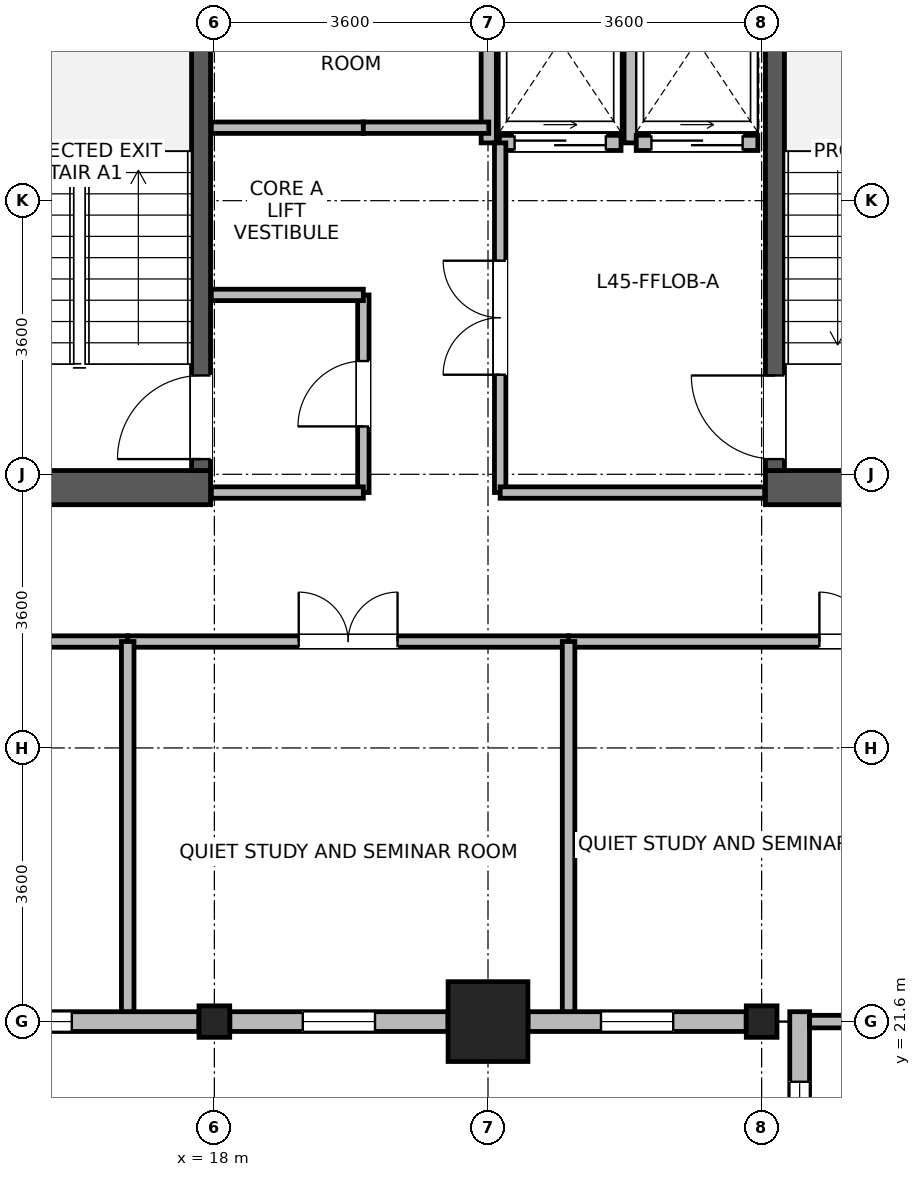
"""IFC4 building model, lengths in metres.
Left out: names, types, materials, properties, quantities, classifications, styles, units other than length and angle.
Written with IfcOpenShell. Run it as: python <this file> out.ifc"""

import sys

from ifc_helpers import new_model, si_unit, direction, frame, frame_2d, origin, origin_2d, place, context, subcontext, project, spatial, rectangle, i_section, extrude, source, transform, mapped, element, fill, save


model = new_model("IFC4")
c1 = context("Model", 3, precision=1e-05, world=origin(), true_north=direction((0.0, 1.0)))
c2 = subcontext(c1, "Body", "Model", "MODEL_VIEW")
j1 = project(units=[si_unit("LENGTHUNIT", "METRE"), si_unit("PLANEANGLEUNIT", "RADIAN")], contexts=[c1])
p1 = place(None, origin())
s1 = spatial("IfcSite", under=j1, at=p1, CompositionType="ELEMENT")
p2 = place(p1, origin())
s2 = spatial("IfcBuilding", under=s1, at=p2, CompositionType="ELEMENT")
p3 = place(p2, frame((0.0, 0.0, 177.2)))
s3 = spatial("IfcBuildingStorey", under=s2, at=p3, CompositionType="ELEMENT", Elevation=177.2)
for number, where, z_axis, x_axis in (
    (1, (14.75, 28.625, 0.0), (0.0, 0.0, 1.0), (1.0, 0.0, 0.0)),
    (2, (25.25, 28.625, 0.0), (0.0, 0.0, 1.0), (1.0, 0.0, 0.0)),
):
    element("IfcWall", number, at=place(p3, frame(where, z_axis=z_axis, x_axis=x_axis)), inside=s3, PredefinedType="SHEAR", context=c2, shape_type="SweptSolid", body=[
        extrude(rectangle(XDim=3.2, YDim=0.45, at=frame_2d((1.6, 0.0))), origin(), (0.0, 0.0, 1.0), 3.46),
    ])
p4 = place(p3, frame((17.825, 28.85, 0.0), z_axis=(0.0, 0.0, 1.0), x_axis=(0.0, 1.0, 0.0)))
e3 = element("IfcWall", 3, at=p4, inside=s3, PredefinedType="SHEAR", context=c2, shape_type="SweptSolid", body=[
    extrude(rectangle(XDim=7.0, YDim=0.25, at=frame_2d((3.5, 0.0))), origin(), (0.0, 0.0, 1.0), 3.46),
])
p5 = place(p4, frame((0.15, 0.0, 0.0)))
e4 = element("IfcOpeningElement", 4, at=p5, cuts=e3, PredefinedType="OPENING", context=c2, shape_type="SweptSolid", body=[
    extrude(rectangle(XDim=1.1, YDim=2.08, at=frame_2d((0.55, 1.04))), frame((0.0, 0.135, 0.0), z_axis=(0.0, -1.0, 0.0), x_axis=(1.0, 0.0, 0.0)), (0.0, 0.0, 1.0), 0.27),
])
p6 = place(p3, frame((25.375, 28.85, 0.0), z_axis=(0.0, 0.0, 1.0), x_axis=(0.0, 1.0, 0.0)))
e5 = element("IfcWall", 5, at=p6, inside=s3, PredefinedType="SHEAR", context=c2, shape_type="SweptSolid", body=[
    extrude(rectangle(XDim=7.0, YDim=0.25, at=frame_2d((3.5, 0.0))), origin(), (0.0, 0.0, 1.0), 3.46),
])
p7 = place(p6, frame((0.15, 0.0, 0.0)))
e6 = element("IfcOpeningElement", 6, at=p7, cuts=e5, PredefinedType="OPENING", context=c2, shape_type="SweptSolid", body=[
    extrude(rectangle(XDim=1.1, YDim=2.08, at=frame_2d((0.55, 1.04))), frame((0.0, 0.135, 0.0), z_axis=(0.0, -1.0, 0.0), x_axis=(1.0, 0.0, 0.0)), (0.0, 0.0, 1.0), 0.27),
])
m1 = source(origin(), c2, "Body", "SweptSolid", [
    extrude(rectangle(XDim=1.05, YDim=1.05, at=origin_2d()), origin(), (0.0, 0.0, 1.0), 3.7),
])
p8 = place(p3, frame((21.6, 21.6, 0.0), z_axis=(0.0, 0.0, 1.0), x_axis=(1.0, 0.0, 0.0)))
e7 = element("IfcColumn", 7, at=p8, inside=s3, PredefinedType="COLUMN", context=c2, shape_type="MappedRepresentation", body=[
    mapped(m1, transform((0.0, 0.0, 0.0), x_axis=(1.0, 0.0, 0.0), y_axis=(0.0, 1.0, 0.0), z_axis=(0.0, 0.0, 1.0), scale=1.0)),
])
m2 = source(origin(), c2, "Body", "SweptSolid", [
    extrude(i_section(OverallWidth=0.404, OverallDepth=0.414, WebThickness=0.021, FlangeThickness=0.028, FilletRadius=0.015, at=origin_2d()), origin(), (0.0, 0.0, 1.0), 3.7),
])
for number, where, z_axis, x_axis in (
    (8, (18.0, 21.6, 0.0), (0.0, 0.0, 1.0), (1.0, 0.0, 0.0)),
    (9, (25.2, 21.6, 0.0), (0.0, 0.0, 1.0), (1.0, 0.0, 0.0)),
):
    element("IfcColumn", number, at=place(p3, frame(where, z_axis=z_axis, x_axis=x_axis)), inside=s3, PredefinedType="COLUMN", context=c2, shape_type="MappedRepresentation", body=[
        mapped(m2, transform((0.0, 0.0, 0.0), x_axis=(1.0, 0.0, 0.0), y_axis=(0.0, 1.0, 0.0), z_axis=(0.0, 0.0, 1.0), scale=1.0)),
    ])
p9 = place(p3, frame((17.797, 21.6, 0.0), z_axis=(0.0, 0.0, 1.0), x_axis=(-1.0, 0.0, 0.0)))
e10 = element("IfcWall", 10, at=p9, inside=s3, PredefinedType="STANDARD", context=c2, shape_type="SweptSolid", body=[
    extrude(rectangle(XDim=2.871, YDim=0.26, at=frame_2d((1.436, 0.0))), origin(), (0.0, 0.0, 1.0), 2.99),
])
p10 = place(p9, frame((1.673, 0.0, 0.85)))
e11 = element("IfcOpeningElement", 11, at=p10, cuts=e10, PredefinedType="OPENING", context=c2, shape_type="SweptSolid", body=[
    extrude(rectangle(XDim=0.95, YDim=1.75, at=frame_2d((0.475, 0.875))), frame((0.0, 0.14, 0.0), z_axis=(0.0, -1.0, 0.0), x_axis=(1.0, 0.0, 0.0)), (0.0, 0.0, 1.0), 0.28),
])
p11 = place(p3, frame((21.074, 21.6, 0.0), z_axis=(0.0, 0.0, 1.0), x_axis=(-1.0, 0.0, 0.0)))
e12 = element("IfcWall", 12, at=p11, inside=s3, PredefinedType="STANDARD", context=c2, shape_type="SweptSolid", body=[
    extrude(rectangle(XDim=2.871, YDim=0.26, at=frame_2d((1.436, 0.0))), origin(), (0.0, 0.0, 1.0), 2.99),
])
p12 = place(p11, frame((0.96, 0.0, 0.85)))
e13 = element("IfcOpeningElement", 13, at=p12, cuts=e12, PredefinedType="OPENING", context=c2, shape_type="SweptSolid", body=[
    extrude(rectangle(XDim=0.95, YDim=1.75, at=frame_2d((0.475, 0.875))), frame((0.0, 0.14, 0.0), z_axis=(0.0, -1.0, 0.0), x_axis=(1.0, 0.0, 0.0)), (0.0, 0.0, 1.0), 0.28),
])
p13 = place(p3, frame((24.997, 21.6, 0.0), z_axis=(0.0, 0.0, 1.0), x_axis=(-1.0, 0.0, 0.0)))
e14 = element("IfcWall", 14, at=p13, inside=s3, PredefinedType="STANDARD", context=c2, shape_type="SweptSolid", body=[
    extrude(rectangle(XDim=2.871, YDim=0.26, at=frame_2d((1.436, 0.0))), origin(), (0.0, 0.0, 1.0), 2.99),
])
p14 = place(p13, frame((0.96, 0.0, 0.85)))
e15 = element("IfcOpeningElement", 15, at=p14, cuts=e14, PredefinedType="OPENING", context=c2, shape_type="SweptSolid", body=[
    extrude(rectangle(XDim=0.95, YDim=1.75, at=frame_2d((0.475, 0.875))), frame((0.0, 0.14, 0.0), z_axis=(0.0, -1.0, 0.0), x_axis=(1.0, 0.0, 0.0)), (0.0, 0.0, 1.0), 0.28),
])
p15 = place(p3, frame((25.7, 1.67, 0.0), z_axis=(0.0, 0.0, 1.0), x_axis=(0.0, 1.0, 0.0)))
e16 = element("IfcWall", 16, at=p15, inside=s3, PredefinedType="STANDARD", context=c2, shape_type="SweptSolid", body=[
    extrude(rectangle(XDim=20.06, YDim=0.26, at=frame_2d((10.03, 0.0))), origin(), (0.0, 0.0, 1.0), 3.44),
])
p16 = place(p15, frame((0.922, 0.0, 0.85)))
e17 = element("IfcOpeningElement", 17, at=p16, cuts=e16, PredefinedType="OPENING", context=c2, shape_type="SweptSolid", body=[
    extrude(rectangle(XDim=1.5, YDim=1.85, at=frame_2d((0.75, 0.925))), frame((0.0, 0.14, 0.0), z_axis=(0.0, -1.0, 0.0), x_axis=(1.0, 0.0, 0.0)), (0.0, 0.0, 1.0), 0.28),
])
p17 = place(p15, frame((7.608, 0.0, 0.85)))
e18 = element("IfcOpeningElement", 18, at=p17, cuts=e16, PredefinedType="OPENING", context=c2, shape_type="SweptSolid", body=[
    extrude(rectangle(XDim=1.5, YDim=1.85, at=frame_2d((0.75, 0.925))), frame((0.0, 0.14, 0.0), z_axis=(0.0, -1.0, 0.0), x_axis=(1.0, 0.0, 0.0)), (0.0, 0.0, 1.0), 0.28),
])
p18 = place(p15, frame((10.952, 0.0, 0.85)))
e19 = element("IfcOpeningElement", 19, at=p18, cuts=e16, PredefinedType="OPENING", context=c2, shape_type="SweptSolid", body=[
    extrude(rectangle(XDim=1.5, YDim=1.85, at=frame_2d((0.75, 0.925))), frame((0.0, 0.14, 0.0), z_axis=(0.0, -1.0, 0.0), x_axis=(1.0, 0.0, 0.0)), (0.0, 0.0, 1.0), 0.28),
])
p19 = place(p15, frame((14.295, 0.0, 0.85)))
e20 = element("IfcOpeningElement", 20, at=p19, cuts=e16, PredefinedType="OPENING", context=c2, shape_type="SweptSolid", body=[
    extrude(rectangle(XDim=1.5, YDim=1.85, at=frame_2d((0.75, 0.925))), frame((0.0, 0.14, 0.0), z_axis=(0.0, -1.0, 0.0), x_axis=(1.0, 0.0, 0.0)), (0.0, 0.0, 1.0), 0.28),
])
p20 = place(p15, frame((17.638, 0.0, 0.85)))
e21 = element("IfcOpeningElement", 21, at=p20, cuts=e16, PredefinedType="OPENING", context=c2, shape_type="SweptSolid", body=[
    extrude(rectangle(XDim=1.5, YDim=1.85, at=frame_2d((0.75, 0.925))), frame((0.0, 0.14, 0.0), z_axis=(0.0, -1.0, 0.0), x_axis=(1.0, 0.0, 0.0)), (0.0, 0.0, 1.0), 0.28),
])
p21 = place(p3, frame((21.75, 33.16, 0.0), z_axis=(0.0, 0.0, 1.0), x_axis=(1.0, 0.0, 0.0)))
e22 = element("IfcWall", 22, at=p21, inside=s3, PredefinedType="PARTITIONING", context=c2, shape_type="SweptSolid", body=[
    extrude(rectangle(XDim=1.6, YDim=0.2, at=frame_2d((0.8, 0.0))), origin(), (0.0, 0.0, 1.0), 3.44),
])
p22 = place(p21, frame((0.2, 0.0, 0.0)))
e23 = element("IfcOpeningElement", 23, at=p22, cuts=e22, PredefinedType="OPENING", context=c2, shape_type="SweptSolid", body=[
    extrude(rectangle(XDim=1.2, YDim=2.12, at=frame_2d((0.6, 1.06))), frame((0.0, 0.11, 0.0), z_axis=(0.0, -1.0, 0.0), x_axis=(1.0, 0.0, 0.0)), (0.0, 0.0, 1.0), 0.22),
])
for number, where, z_axis, x_axis in (
    (24, (21.61, 33.16, 0.0), (0.0, 0.0, 1.0), (0.0, 1.0, 0.0)),
    (25, (23.49, 33.16, 0.0), (0.0, 0.0, 1.0), (0.0, 1.0, 0.0)),
):
    element("IfcWall", number, at=place(p3, frame(where, z_axis=z_axis, x_axis=x_axis)), inside=s3, PredefinedType="PARTITIONING", context=c2, shape_type="SweptSolid", body=[
        extrude(rectangle(XDim=2.68, YDim=0.2, at=frame_2d((1.34, 0.0))), origin(), (0.0, 0.0, 1.0), 3.44),
    ])
p23 = place(p3, frame((23.55, 33.16, 0.0), z_axis=(0.0, 0.0, 1.0), x_axis=(1.0, 0.0, 0.0)))
e26 = element("IfcWall", 26, at=p23, inside=s3, PredefinedType="PARTITIONING", context=c2, shape_type="SweptSolid", body=[
    extrude(rectangle(XDim=1.6, YDim=0.2, at=frame_2d((0.8, 0.0))), origin(), (0.0, 0.0, 1.0), 3.44),
])
p24 = place(p23, frame((0.2, 0.0, 0.0)))
e27 = element("IfcOpeningElement", 27, at=p24, cuts=e26, PredefinedType="OPENING", context=c2, shape_type="SweptSolid", body=[
    extrude(rectangle(XDim=1.2, YDim=2.12, at=frame_2d((0.6, 1.06))), frame((0.0, 0.11, 0.0), z_axis=(0.0, -1.0, 0.0), x_axis=(1.0, 0.0, 0.0)), (0.0, 0.0, 1.0), 0.22),
])
p25 = place(p3, frame((6.54, 26.6, 0.0), z_axis=(0.0, 0.0, 1.0), x_axis=(1.0, 0.0, 0.0)))
e28 = element("IfcWall", 28, at=p25, inside=s3, PredefinedType="PARTITIONING", context=c2, shape_type="SweptSolid", body=[
    extrude(rectangle(XDim=10.32, YDim=0.15, at=frame_2d((5.16, 0.0))), origin(), (0.0, 0.0, 1.0), 3.44),
])
p26 = place(p25, frame((4.51, 0.0, 0.0)))
e29 = element("IfcOpeningElement", 29, at=p26, cuts=e28, PredefinedType="OPENING", context=c2, shape_type="SweptSolid", body=[
    extrude(rectangle(XDim=1.3, YDim=2.12, at=frame_2d((0.65, 1.06))), frame((0.0, 0.085, 0.0), z_axis=(0.0, -1.0, 0.0), x_axis=(1.0, 0.0, 0.0)), (0.0, 0.0, 1.0), 0.17),
])
p27 = place(p3, frame((22.66, 26.6, 0.0), z_axis=(0.0, 0.0, 1.0), x_axis=(1.0, 0.0, 0.0)))
e30 = element("IfcWall", 30, at=p27, inside=s3, PredefinedType="PARTITIONING", context=c2, shape_type="SweptSolid", body=[
    extrude(rectangle(XDim=7.9, YDim=0.15, at=frame_2d((3.95, 0.0))), origin(), (0.0, 0.0, 1.0), 3.44),
])
p28 = place(p27, frame((3.3, 0.0, 0.0)))
e31 = element("IfcOpeningElement", 31, at=p28, cuts=e30, PredefinedType="OPENING", context=c2, shape_type="SweptSolid", body=[
    extrude(rectangle(XDim=1.3, YDim=2.12, at=frame_2d((0.65, 1.06))), frame((0.0, 0.085, 0.0), z_axis=(0.0, -1.0, 0.0), x_axis=(1.0, 0.0, 0.0)), (0.0, 0.0, 1.0), 0.17),
])
p29 = place(p3, frame((16.86, 26.6, 0.0), z_axis=(0.0, 0.0, 1.0), x_axis=(1.0, 0.0, 0.0)))
e32 = element("IfcWall", 32, at=p29, inside=s3, PredefinedType="PARTITIONING", context=c2, shape_type="SweptSolid", body=[
    extrude(rectangle(XDim=5.8, YDim=0.15, at=frame_2d((2.9, 0.0))), origin(), (0.0, 0.0, 1.0), 3.44),
])
p30 = place(p29, frame((2.25, 0.0, 0.0)))
e33 = element("IfcOpeningElement", 33, at=p30, cuts=e32, PredefinedType="OPENING", context=c2, shape_type="SweptSolid", body=[
    extrude(rectangle(XDim=1.3, YDim=2.12, at=frame_2d((0.65, 1.06))), frame((0.0, 0.085, 0.0), z_axis=(0.0, -1.0, 0.0), x_axis=(1.0, 0.0, 0.0)), (0.0, 0.0, 1.0), 0.17),
])
p31 = place(p3, frame((19.96, 28.56, 0.0), z_axis=(0.0, 0.0, 1.0), x_axis=(0.0, 1.0, 0.0)))
e34 = element("IfcWall", 34, at=p31, inside=s3, PredefinedType="PARTITIONING", context=c2, shape_type="SweptSolid", body=[
    extrude(rectangle(XDim=2.6, YDim=0.15, at=frame_2d((1.3, 0.0))), origin(), (0.0, 0.0, 1.0), 3.44),
])
p32 = place(p31, frame((0.87, 0.0, 0.0)))
e35 = element("IfcOpeningElement", 35, at=p32, cuts=e34, PredefinedType="OPENING", context=c2, shape_type="SweptSolid", body=[
    extrude(rectangle(XDim=0.86, YDim=2.02, at=frame_2d((0.43, 1.01))), frame((0.0, 0.085, 0.0), z_axis=(0.0, -1.0, 0.0), x_axis=(1.0, 0.0, 0.0)), (0.0, 0.0, 1.0), 0.17),
])
p33 = place(p3, frame((17.96, 28.56, 0.0), z_axis=(0.0, 0.0, 1.0), x_axis=(1.0, 0.0, 0.0)))
e36 = element("IfcWall", 36, at=p33, inside=s3, PredefinedType="PARTITIONING", context=c2, shape_type="SweptSolid", body=[
    extrude(rectangle(XDim=2.0, YDim=0.15, at=frame_2d((1.0, 0.0))), origin(), (0.0, 0.0, 1.0), 2.44),
])
for number, where, z_axis, x_axis in (
    (37, (17.96, 31.16, 0.0), (0.0, 0.0, 1.0), (1.0, 0.0, 0.0)),
    (38, (17.96, 33.36, 0.0), (0.0, 0.0, 1.0), (1.0, 0.0, 0.0)),
):
    element("IfcWall", number, at=place(p3, frame(where, z_axis=z_axis, x_axis=x_axis)), inside=s3, PredefinedType="PARTITIONING", context=c2, shape_type="SweptSolid", body=[
        extrude(rectangle(XDim=2.0, YDim=0.15, at=frame_2d((1.0, 0.0))), origin(), (0.0, 0.0, 1.0), 3.44),
    ])
p34 = place(p3, frame((19.96, 33.36, 0.0), z_axis=(0.0, 0.0, 1.0), x_axis=(1.0, 0.0, 0.0)))
e39 = element("IfcWall", 39, at=p34, inside=s3, PredefinedType="PARTITIONING", context=c2, shape_type="SweptSolid", body=[
    extrude(rectangle(XDim=1.65, YDim=0.15, at=frame_2d((0.825, 0.0))), origin(), (0.0, 0.0, 1.0), 3.44),
])
for number, where, z_axis, x_axis in (
    (40, (16.86, 21.732, 0.0), (0.0, 0.0, 1.0), (0.0, 1.0, 0.0)),
    (41, (22.66, 21.732, 0.0), (0.0, 0.0, 1.0), (0.0, 1.0, 0.0)),
):
    element("IfcWall", number, at=place(p3, frame(where, z_axis=z_axis, x_axis=x_axis)), inside=s3, PredefinedType="PARTITIONING", context=c2, shape_type="SweptSolid", body=[
        extrude(rectangle(XDim=4.868, YDim=0.165, at=frame_2d((2.434, 0.0))), origin(), (0.0, 0.0, 1.0), 3.44),
    ])
p35 = place(p3, frame((25.832, 21.6, 0.0), z_axis=(0.0, 0.0, 1.0), x_axis=(1.0, 0.0, 0.0)))
e42 = element("IfcWall", 42, at=p35, inside=s3, PredefinedType="PARTITIONING", context=c2, shape_type="SweptSolid", body=[
    extrude(rectangle(XDim=4.728, YDim=0.165, at=frame_2d((2.364, 0.0))), origin(), (0.0, 0.0, 1.0), 2.99),
])
p36 = place(p3, frame((21.76, 28.56, 0.0), z_axis=(0.0, 0.0, 1.0), x_axis=(0.0, 1.0, 0.0)))
e43 = element("IfcWall", 43, at=p36, inside=s3, PredefinedType="PARTITIONING", context=c2, shape_type="SweptSolid", body=[
    extrude(rectangle(XDim=4.6, YDim=0.15, at=frame_2d((2.3, 0.0))), origin(), (0.0, 0.0, 1.0), 3.44),
])
p37 = place(p36, frame((1.55, 0.0, 0.0)))
e44 = element("IfcOpeningElement", 44, at=p37, cuts=e43, PredefinedType="OPENING", context=c2, shape_type="SweptSolid", body=[
    extrude(rectangle(XDim=1.5, YDim=2.1, at=frame_2d((0.75, 1.05))), frame((0.0, 0.085, 0.0), z_axis=(0.0, -1.0, 0.0), x_axis=(1.0, 0.0, 0.0)), (0.0, 0.0, 1.0), 0.17),
])
p38 = place(p3, frame((21.76, 28.56, 0.0), z_axis=(0.0, 0.0, 1.0), x_axis=(1.0, 0.0, 0.0)))
e45 = element("IfcWall", 45, at=p38, inside=s3, PredefinedType="PARTITIONING", context=c2, shape_type="SweptSolid", body=[
    extrude(rectangle(XDim=3.48, YDim=0.15, at=frame_2d((1.74, 0.0))), origin(), (0.0, 0.0, 1.0), 2.44),
])
p39 = place(p10, origin())
e46 = element("IfcWindow", 46, at=p39, inside=s3, PartitioningType="SINGLE_PANEL", PredefinedType="WINDOW", context=c2, shape_type="SweptSolid", body=[
    extrude(rectangle(XDim=0.95, YDim=1.75, at=frame_2d((0.475, 0.875))), frame((0.0, 0.03, 0.0), z_axis=(0.0, -1.0, 0.0), x_axis=(1.0, 0.0, 0.0)), (0.0, 0.0, 1.0), 0.06),
])
fill(e11, e46)
p40 = place(p12, origin())
e47 = element("IfcWindow", 47, at=p40, inside=s3, PartitioningType="SINGLE_PANEL", PredefinedType="WINDOW", context=c2, shape_type="SweptSolid", body=[
    extrude(rectangle(XDim=0.95, YDim=1.75, at=frame_2d((0.475, 0.875))), frame((0.0, 0.03, 0.0), z_axis=(0.0, -1.0, 0.0), x_axis=(1.0, 0.0, 0.0)), (0.0, 0.0, 1.0), 0.06),
])
fill(e13, e47)
p41 = place(p14, origin())
e48 = element("IfcWindow", 48, at=p41, inside=s3, PartitioningType="SINGLE_PANEL", PredefinedType="WINDOW", context=c2, shape_type="SweptSolid", body=[
    extrude(rectangle(XDim=0.95, YDim=1.75, at=frame_2d((0.475, 0.875))), frame((0.0, 0.03, 0.0), z_axis=(0.0, -1.0, 0.0), x_axis=(1.0, 0.0, 0.0)), (0.0, 0.0, 1.0), 0.06),
])
fill(e15, e48)
p42 = place(p20, origin())
e49 = element("IfcWindow", 49, at=p42, inside=s3, PartitioningType="SINGLE_PANEL", PredefinedType="WINDOW", context=c2, shape_type="SweptSolid", body=[
    extrude(rectangle(XDim=1.5, YDim=1.85, at=frame_2d((0.75, 0.925))), frame((0.0, 0.03, 0.0), z_axis=(0.0, -1.0, 0.0), x_axis=(1.0, 0.0, 0.0)), (0.0, 0.0, 1.0), 0.06),
])
fill(e21, e49)
p43 = place(p5, origin())
e50 = element("IfcDoor", 50, at=p43, inside=s3, OperationType="SINGLE_SWING_LEFT", PredefinedType="DOOR", context=c2, shape_type="SweptSolid", body=[
    extrude(rectangle(XDim=1.1, YDim=2.08, at=frame_2d((0.55, 1.04))), frame((0.0, 0.025, 0.0), z_axis=(0.0, -1.0, 0.0), x_axis=(1.0, 0.0, 0.0)), (0.0, 0.0, 1.0), 0.05),
])
fill(e4, e50)
p44 = place(p7, origin())
e51 = element("IfcDoor", 51, at=p44, inside=s3, OperationType="SINGLE_SWING_RIGHT", PredefinedType="DOOR", context=c2, shape_type="SweptSolid", body=[
    extrude(rectangle(XDim=1.1, YDim=2.08, at=frame_2d((0.55, 1.04))), frame((0.0, 0.025, 0.0), z_axis=(0.0, -1.0, 0.0), x_axis=(1.0, 0.0, 0.0)), (0.0, 0.0, 1.0), 0.05),
])
fill(e6, e51)
p45 = place(p22, origin())
e52 = element("IfcDoor", 52, at=p45, inside=s3, OperationType="SLIDING_TO_RIGHT", PredefinedType="DOOR", context=c2, shape_type="SweptSolid", body=[
    extrude(rectangle(XDim=1.2, YDim=2.12, at=frame_2d((0.6, 1.06))), frame((0.0, 0.025, 0.0), z_axis=(0.0, -1.0, 0.0), x_axis=(1.0, 0.0, 0.0)), (0.0, 0.0, 1.0), 0.05),
])
fill(e23, e52)
p46 = place(p24, origin())
e53 = element("IfcDoor", 53, at=p46, inside=s3, OperationType="SLIDING_TO_RIGHT", PredefinedType="DOOR", context=c2, shape_type="SweptSolid", body=[
    extrude(rectangle(XDim=1.2, YDim=2.12, at=frame_2d((0.6, 1.06))), frame((0.0, 0.025, 0.0), z_axis=(0.0, -1.0, 0.0), x_axis=(1.0, 0.0, 0.0)), (0.0, 0.0, 1.0), 0.05),
])
fill(e27, e53)
p47 = place(p28, origin())
e54 = element("IfcDoor", 54, at=p47, inside=s3, OperationType="DOUBLE_DOOR_SINGLE_SWING", PredefinedType="DOOR", context=c2, shape_type="SweptSolid", body=[
    extrude(rectangle(XDim=1.3, YDim=2.12, at=frame_2d((0.65, 1.06))), frame((0.0, 0.025, 0.0), z_axis=(0.0, -1.0, 0.0), x_axis=(1.0, 0.0, 0.0)), (0.0, 0.0, 1.0), 0.05),
])
fill(e31, e54)
p48 = place(p30, origin())
e55 = element("IfcDoor", 55, at=p48, inside=s3, OperationType="DOUBLE_DOOR_SINGLE_SWING", PredefinedType="DOOR", context=c2, shape_type="SweptSolid", body=[
    extrude(rectangle(XDim=1.3, YDim=2.12, at=frame_2d((0.65, 1.06))), frame((0.0, 0.025, 0.0), z_axis=(0.0, -1.0, 0.0), x_axis=(1.0, 0.0, 0.0)), (0.0, 0.0, 1.0), 0.05),
])
fill(e33, e55)
p49 = place(p32, origin())
e56 = element("IfcDoor", 56, at=p49, inside=s3, OperationType="SINGLE_SWING_LEFT", PredefinedType="DOOR", context=c2, shape_type="SweptSolid", body=[
    extrude(rectangle(XDim=0.86, YDim=2.02, at=frame_2d((0.43, 1.01))), frame((0.0, 0.025, 0.0), z_axis=(0.0, -1.0, 0.0), x_axis=(1.0, 0.0, 0.0)), (0.0, 0.0, 1.0), 0.05),
])
fill(e35, e56)
p50 = place(p37, origin())
e57 = element("IfcDoor", 57, at=p50, inside=s3, OperationType="DOUBLE_DOOR_SINGLE_SWING", PredefinedType="DOOR", context=c2, shape_type="SweptSolid", body=[
    extrude(rectangle(XDim=1.5, YDim=2.1, at=frame_2d((0.75, 1.05))), frame((0.0, 0.025, 0.0), z_axis=(0.0, -1.0, 0.0), x_axis=(1.0, 0.0, 0.0)), (0.0, 0.0, 1.0), 0.05),
])
fill(e44, e57)
save(model, sys.argv[1])
